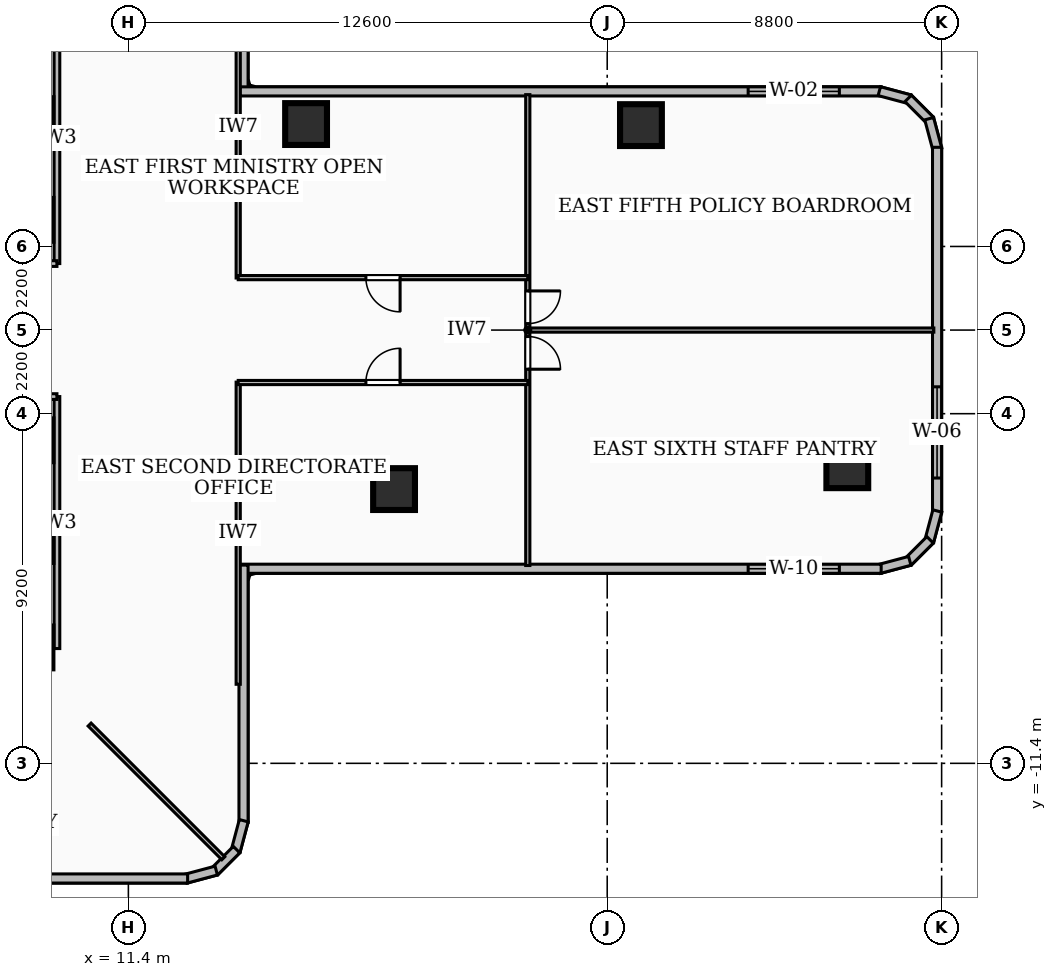
"""IFC4 building model, lengths in metres.
Left out: names, types, materials, properties, quantities, classifications, styles, units other than length and angle.
Written with IfcOpenShell. Run it as: python <this file> out.ifc"""

import sys

from ifc_helpers import new_model, si_unit, direction, frame, frame_2d, origin, origin_2d, place, context, subcontext, project, spatial, rectangle, extrude, element, fill, save


model = new_model("IFC4")
c1 = context("Model", 3, precision=1e-05, world=origin(), true_north=direction((0.0, 1.0)))
c2 = subcontext(c1, "Body", "Model", "MODEL_VIEW")
j1 = project(units=[si_unit("LENGTHUNIT", "METRE"), si_unit("PLANEANGLEUNIT", "RADIAN")], contexts=[c1])
p1 = place(None, origin())
s1 = spatial("IfcSite", under=j1, at=p1, CompositionType="ELEMENT")
p2 = place(p1, origin())
s2 = spatial("IfcBuilding", under=s1, at=p2, CompositionType="ELEMENT")
p3 = place(p2, frame((0.0, 0.0, 28.08)))
s3 = spatial("IfcBuildingStorey", under=s2, at=p3, CompositionType="ELEMENT", Elevation=28.08)
for number, where, z_axis, x_axis in (
    (1, (8.85, -5.55, 0.0), (0.0, 0.0, 1.0), (1.0, 0.0, 0.0)),
    (2, (8.85, -2.9, 0.0), (0.0, 0.0, 1.0), (1.0, 0.0, 0.0)),
    (3, (8.85, 2.9, 0.0), (0.0, 0.0, 1.0), (1.0, 0.0, 0.0)),
    (4, (8.85, 5.55, 0.0), (0.0, 0.0, 1.0), (1.0, 0.0, 0.0)),
    (5, (8.85, -8.35, 0.0), (0.0, 0.0, 1.0), (1.0, 0.0, 0.0)),
    (6, (18.391, -4.184, 0.0), (0.0, 0.0, 1.0), (1.0, 0.0, 0.0)),
    (7, (16.076, 5.421, 0.0), (0.0, 0.0, 1.0), (1.0, 0.0, 0.0)),
    (8, (30.318, -3.609, 0.0), (0.0, 0.0, 1.0), (1.0, 0.0, 0.0)),
    (9, (24.888, 5.393, 0.0), (0.0, 0.0, 1.0), (1.0, 0.0, 0.0)),
):
    element("IfcColumn", number, at=place(p3, frame(where, z_axis=z_axis, x_axis=x_axis)), inside=s3, PredefinedType="COLUMN", context=c2, shape_type="SweptSolid", body=[
        extrude(rectangle(XDim=1.1, YDim=1.1, at=origin_2d()), origin(), (0.0, 0.0, 1.0), 3.6),
    ])
p4 = place(p3, frame((14.43, 12.959, 0.0), z_axis=(0.0, 0.0, 1.0), x_axis=(0.0, -1.0, 0.0)))
e10 = element("IfcWall", 10, at=p4, inside=s3, PredefinedType="SOLIDWALL", context=c2, shape_type="SweptSolid", body=[
    extrude(rectangle(XDim=6.775, YDim=0.24, at=frame_2d((3.387, 0.0))), origin(), (0.0, 0.0, 1.0), 3.34),
])
p5 = place(p3, frame((14.334, 6.28, 0.0), z_axis=(0.0, 0.0, 1.0), x_axis=(1.0, 0.0, 0.0)))
e11 = element("IfcWall", 11, at=p5, inside=s3, PredefinedType="SOLIDWALL", context=c2, shape_type="SweptSolid", body=[
    extrude(rectangle(XDim=16.875, YDim=0.24, at=frame_2d((8.438, 0.0))), origin(), (0.0, 0.0, 1.0), 3.34),
])
p6 = place(p5, frame((13.375, 0.0, 0.85)))
e12 = element("IfcOpeningElement", 12, at=p6, cuts=e11, PredefinedType="OPENING", context=c2, shape_type="SweptSolid", body=[
    extrude(rectangle(XDim=2.4, YDim=2.1, at=frame_2d((1.2, 1.05))), frame((0.0, 0.13, 0.0), z_axis=(0.0, -1.0, 0.0), x_axis=(1.0, 0.0, 0.0)), (0.0, 0.0, 1.0), 0.26),
])
p7 = place(p3, frame((31.16, 6.286, 0.0), z_axis=(0.0, 0.0, 1.0), x_axis=(0.966234939601, -0.25766265056, 0.0)))
e13 = element("IfcWall", 13, at=p7, inside=s3, PredefinedType="SOLIDWALL", context=c2, shape_type="SweptSolid", body=[
    extrude(rectangle(XDim=0.83, YDim=0.24, at=frame_2d((0.415, 0.0))), origin(), (0.0, 0.0, 1.0), 3.34),
])
p8 = place(p3, frame((31.92, 6.096, 0.0), z_axis=(0.0, 0.0, 1.0), x_axis=(0.707256607812, -0.706956922808, 0.0)))
e14 = element("IfcWall", 14, at=p8, inside=s3, PredefinedType="SOLIDWALL", context=c2, shape_type="SweptSolid", body=[
    extrude(rectangle(XDim=0.815, YDim=0.24, at=frame_2d((0.407, 0.0))), origin(), (0.0, 0.0, 1.0), 3.34),
])
p9 = place(p3, frame((32.472, 5.562, 0.0), z_axis=(0.0, 0.0, 1.0), x_axis=(0.257937227116, -0.966161677396, 0.0)))
e15 = element("IfcWall", 15, at=p9, inside=s3, PredefinedType="SOLIDWALL", context=c2, shape_type="SweptSolid", body=[
    extrude(rectangle(XDim=0.83, YDim=0.24, at=frame_2d((0.415, 0.0))), origin(), (0.0, 0.0, 1.0), 3.34),
])
p10 = place(p3, frame((32.68, 4.809, 0.0), z_axis=(0.0, 0.0, 1.0), x_axis=(0.0, -1.0, 0.0)))
e16 = element("IfcWall", 16, at=p10, inside=s3, PredefinedType="SOLIDWALL", context=c2, shape_type="SweptSolid", body=[
    extrude(rectangle(XDim=9.618, YDim=0.24, at=frame_2d((4.809, 0.0))), origin(), (0.0, 0.0, 1.0), 3.34),
])
p11 = place(p10, frame((6.302, 0.0, 0.85)))
e17 = element("IfcOpeningElement", 17, at=p11, cuts=e16, PredefinedType="OPENING", context=c2, shape_type="SweptSolid", body=[
    extrude(rectangle(XDim=2.4, YDim=1.85, at=frame_2d((1.2, 0.925))), frame((0.0, 0.13, 0.0), z_axis=(0.0, -1.0, 0.0), x_axis=(1.0, 0.0, 0.0)), (0.0, 0.0, 1.0), 0.26),
])
p12 = place(p3, frame((32.686, -4.76, 0.0), z_axis=(0.0, 0.0, 1.0), x_axis=(-0.257937227116, -0.966161677396, 0.0)))
e18 = element("IfcWall", 18, at=p12, inside=s3, PredefinedType="SOLIDWALL", context=c2, shape_type="SweptSolid", body=[
    extrude(rectangle(XDim=0.83, YDim=0.24, at=frame_2d((0.415, 0.0))), origin(), (0.0, 0.0, 1.0), 3.34),
])
p13 = place(p3, frame((32.496, -5.52, 0.0), z_axis=(0.0, 0.0, 1.0), x_axis=(-0.707256607812, -0.706956922808, 0.0)))
e19 = element("IfcWall", 19, at=p13, inside=s3, PredefinedType="SOLIDWALL", context=c2, shape_type="SweptSolid", body=[
    extrude(rectangle(XDim=0.815, YDim=0.24, at=frame_2d((0.407, 0.0))), origin(), (0.0, 0.0, 1.0), 3.34),
])
p14 = place(p3, frame((31.962, -6.072, 0.0), z_axis=(0.0, 0.0, 1.0), x_axis=(-0.966234939601, -0.25766265056, 0.0)))
e20 = element("IfcWall", 20, at=p14, inside=s3, PredefinedType="SOLIDWALL", context=c2, shape_type="SweptSolid", body=[
    extrude(rectangle(XDim=0.83, YDim=0.24, at=frame_2d((0.415, 0.0))), origin(), (0.0, 0.0, 1.0), 3.34),
])
p15 = place(p3, frame((31.209, -6.28, 0.0), z_axis=(0.0, 0.0, 1.0), x_axis=(-1.0, 0.0, 0.0)))
e21 = element("IfcWall", 21, at=p15, inside=s3, PredefinedType="SOLIDWALL", context=c2, shape_type="SweptSolid", body=[
    extrude(rectangle(XDim=16.875, YDim=0.24, at=frame_2d((8.438, 0.0))), origin(), (0.0, 0.0, 1.0), 3.34),
])
p16 = place(p15, frame((1.1, 0.0, 0.85)))
e22 = element("IfcOpeningElement", 22, at=p16, cuts=e21, PredefinedType="OPENING", context=c2, shape_type="SweptSolid", body=[
    extrude(rectangle(XDim=2.4, YDim=1.65, at=frame_2d((1.2, 0.825))), frame((0.0, 0.13, 0.0), z_axis=(0.0, -1.0, 0.0), x_axis=(1.0, 0.0, 0.0)), (0.0, 0.0, 1.0), 0.26),
])
p17 = place(p3, frame((14.43, -6.184, 0.0), z_axis=(0.0, 0.0, 1.0), x_axis=(0.0, -1.0, 0.0)))
e23 = element("IfcWall", 23, at=p17, inside=s3, PredefinedType="SOLIDWALL", context=c2, shape_type="SweptSolid", body=[
    extrude(rectangle(XDim=6.775, YDim=0.24, at=frame_2d((3.387, 0.0))), origin(), (0.0, 0.0, 1.0), 3.34),
])
p18 = place(p3, frame((14.436, -12.91, 0.0), z_axis=(0.0, 0.0, 1.0), x_axis=(-0.257937227116, -0.966161677396, 0.0)))
e24 = element("IfcWall", 24, at=p18, inside=s3, PredefinedType="SOLIDWALL", context=c2, shape_type="SweptSolid", body=[
    extrude(rectangle(XDim=0.83, YDim=0.24, at=frame_2d((0.415, 0.0))), origin(), (0.0, 0.0, 1.0), 3.34),
])
p19 = place(p3, frame((14.246, -13.67, 0.0), z_axis=(0.0, 0.0, 1.0), x_axis=(-0.707106781187, -0.707106781187, 0.0)))
e25 = element("IfcWall", 25, at=p19, inside=s3, PredefinedType="SOLIDWALL", context=c2, shape_type="SweptSolid", body=[
    extrude(rectangle(XDim=0.815, YDim=0.24, at=frame_2d((0.407, 0.0))), origin(), (0.0, 0.0, 1.0), 3.34),
])
p20 = place(p3, frame((13.712, -14.222, 0.0), z_axis=(0.0, 0.0, 1.0), x_axis=(-0.966161677396, -0.257937227116, 0.0)))
e26 = element("IfcWall", 26, at=p20, inside=s3, PredefinedType="SOLIDWALL", context=c2, shape_type="SweptSolid", body=[
    extrude(rectangle(XDim=0.83, YDim=0.24, at=frame_2d((0.415, 0.0))), origin(), (0.0, 0.0, 1.0), 3.34),
])
p21 = place(p3, frame((12.959, -14.43, 0.0), z_axis=(0.0, 0.0, 1.0), x_axis=(-1.0, 0.0, 0.0)))
e27 = element("IfcWall", 27, at=p21, inside=s3, PredefinedType="SOLIDWALL", context=c2, shape_type="SweptSolid", body=[
    extrude(rectangle(XDim=6.775, YDim=0.24, at=frame_2d((3.387, 0.0))), origin(), (0.0, 0.0, 1.0), 2.421),
])
p22 = place(p3, frame((9.52, 1.75, 0.0), z_axis=(0.0, 0.0, 1.0), x_axis=(0.0, 1.0, 0.0)))
e28 = element("IfcWall", 28, at=p22, inside=s3, PredefinedType="PARTITIONING", context=c2, shape_type="SweptSolid", body=[
    extrude(rectangle(XDim=6.63, YDim=0.15, at=frame_2d((3.315, 0.0))), origin(), (0.0, 0.0, 1.0), 2.421),
])
p23 = place(p3, frame((7.85, 1.75, 0.0), z_axis=(0.0, 0.0, 1.0), x_axis=(1.0, 0.0, 0.0)))
e29 = element("IfcWall", 29, at=p23, inside=s3, PredefinedType="PARTITIONING", context=c2, shape_type="SweptSolid", body=[
    extrude(rectangle(XDim=1.67, YDim=0.15, at=frame_2d((0.835, 0.0))), origin(), (0.0, 0.0, 1.0), 2.405),
])
p24 = place(p3, frame((9.52, -8.38, 0.0), z_axis=(0.0, 0.0, 1.0), x_axis=(0.0, 1.0, 0.0)))
e30 = element("IfcWall", 30, at=p24, inside=s3, PredefinedType="PARTITIONING", context=c2, shape_type="SweptSolid", body=[
    extrude(rectangle(XDim=6.63, YDim=0.15, at=frame_2d((3.315, 0.0))), origin(), (0.0, 0.0, 1.0), 2.421),
])
p25 = place(p3, frame((7.85, -1.75, 0.0), z_axis=(0.0, 0.0, 1.0), x_axis=(1.0, 0.0, 0.0)))
e31 = element("IfcWall", 31, at=p25, inside=s3, PredefinedType="PARTITIONING", context=c2, shape_type="SweptSolid", body=[
    extrude(rectangle(XDim=1.67, YDim=0.15, at=frame_2d((0.835, 0.0))), origin(), (0.0, 0.0, 1.0), 2.405),
])
p26 = place(p3, frame((10.38, -10.38, 0.0), z_axis=(0.0, 0.0, 1.0), x_axis=(0.707106781187, -0.707106781187, 0.0)))
e32 = element("IfcWall", 32, at=p26, inside=s3, PredefinedType="PARTITIONING", context=c2, shape_type="SweptSolid", body=[
    extrude(rectangle(XDim=4.975, YDim=0.11, at=frame_2d((2.488, 0.0))), origin(), (0.0, 0.0, 1.0), 3.34),
])
for number, where, z_axis, x_axis in (
    (33, (14.29, 1.37, 0.0), (0.0, 0.0, 1.0), (0.0, 1.0, 0.0)),
    (34, (14.29, -9.32, 0.0), (0.0, 0.0, 1.0), (0.0, 1.0, 0.0)),
):
    element("IfcWall", number, at=place(p3, frame(where, z_axis=z_axis, x_axis=x_axis)), inside=s3, PredefinedType="PARTITIONING", context=c2, shape_type="SweptSolid", body=[
        extrude(rectangle(XDim=7.95, YDim=0.11, at=frame_2d((3.975, 0.0))), origin(), (0.0, 0.0, 1.0), 2.421),
    ])
p27 = place(p3, frame((21.91, 1.38, 0.0), z_axis=(0.0, 0.0, 1.0), x_axis=(-1.0, 0.0, 0.0)))
e35 = element("IfcWall", 35, at=p27, inside=s3, PredefinedType="PARTITIONING", context=c2, shape_type="SweptSolid", body=[
    extrude(rectangle(XDim=7.62, YDim=0.11, at=frame_2d((3.81, 0.0))), origin(), (0.0, 0.0, 1.0), 2.869),
])
p28 = place(p27, frame((3.36, 0.0, 0.0)))
e36 = element("IfcOpeningElement", 36, at=p28, cuts=e35, PredefinedType="OPENING", context=c2, shape_type="SweptSolid", body=[
    extrude(rectangle(XDim=0.9, YDim=2.06, at=frame_2d((0.45, 1.03))), frame((0.0, 0.065, 0.0), z_axis=(0.0, -1.0, 0.0), x_axis=(1.0, 0.0, 0.0)), (0.0, 0.0, 1.0), 0.13),
])
p29 = place(p3, frame((14.29, -1.38, 0.0), z_axis=(0.0, 0.0, 1.0), x_axis=(1.0, 0.0, 0.0)))
e37 = element("IfcWall", 37, at=p29, inside=s3, PredefinedType="PARTITIONING", context=c2, shape_type="SweptSolid", body=[
    extrude(rectangle(XDim=7.62, YDim=0.11, at=frame_2d((3.81, 0.0))), origin(), (0.0, 0.0, 1.0), 2.869),
])
p30 = place(p29, frame((3.36, 0.0, 0.0)))
e38 = element("IfcOpeningElement", 38, at=p30, cuts=e37, PredefinedType="OPENING", context=c2, shape_type="SweptSolid", body=[
    extrude(rectangle(XDim=0.9, YDim=2.06, at=frame_2d((0.45, 1.03))), frame((0.0, 0.065, 0.0), z_axis=(0.0, -1.0, 0.0), x_axis=(1.0, 0.0, 0.0)), (0.0, 0.0, 1.0), 0.13),
])
p31 = place(p3, frame((21.97, 0.0, 0.0), z_axis=(0.0, 0.0, 1.0), x_axis=(1.0, 0.0, 0.0)))
e39 = element("IfcWall", 39, at=p31, inside=s3, PredefinedType="PARTITIONING", context=c2, shape_type="SweptSolid", body=[
    extrude(rectangle(XDim=10.625, YDim=0.11, at=frame_2d((5.312, 0.0))), origin(), (0.0, 0.0, 1.0), 2.72),
])
p32 = place(p3, frame((21.91, 6.195, 0.0), z_axis=(0.0, 0.0, 1.0), x_axis=(0.0, -1.0, 0.0)))
e40 = element("IfcWall", 40, at=p32, inside=s3, PredefinedType="PARTITIONING", context=c2, shape_type="SweptSolid", body=[
    extrude(rectangle(XDim=12.39, YDim=0.11, at=frame_2d((6.195, 0.0))), origin(), (0.0, 0.0, 1.0), 2.421),
])
p33 = place(p32, frame((6.365, 0.0, 0.0)))
e41 = element("IfcOpeningElement", 41, at=p33, cuts=e40, PredefinedType="OPENING", context=c2, shape_type="SweptSolid", body=[
    extrude(rectangle(XDim=0.86, YDim=2.04, at=frame_2d((0.43, 1.02))), frame((0.0, 0.065, 0.0), z_axis=(0.0, -1.0, 0.0), x_axis=(1.0, 0.0, 0.0)), (0.0, 0.0, 1.0), 0.13),
])
p34 = place(p32, frame((5.165, 0.0, 0.0)))
e42 = element("IfcOpeningElement", 42, at=p34, cuts=e40, PredefinedType="OPENING", context=c2, shape_type="SweptSolid", body=[
    extrude(rectangle(XDim=0.86, YDim=2.04, at=frame_2d((0.43, 1.02))), frame((0.0, 0.065, 0.0), z_axis=(0.0, -1.0, 0.0), x_axis=(1.0, 0.0, 0.0)), (0.0, 0.0, 1.0), 0.13),
])
p35 = place(p6, origin())
e43 = element("IfcWindow", 43, at=p35, inside=s3, PartitioningType="SINGLE_PANEL", PredefinedType="WINDOW", context=c2, shape_type="SweptSolid", body=[
    extrude(rectangle(XDim=2.4, YDim=2.1, at=frame_2d((1.2, 1.05))), frame((0.0, 0.03, 0.0), z_axis=(0.0, -1.0, 0.0), x_axis=(1.0, 0.0, 0.0)), (0.0, 0.0, 1.0), 0.06),
])
fill(e12, e43)
p36 = place(p11, origin())
e44 = element("IfcWindow", 44, at=p36, inside=s3, PartitioningType="SINGLE_PANEL", PredefinedType="WINDOW", context=c2, shape_type="SweptSolid", body=[
    extrude(rectangle(XDim=2.4, YDim=1.85, at=frame_2d((1.2, 0.925))), frame((0.0, 0.03, 0.0), z_axis=(0.0, -1.0, 0.0), x_axis=(1.0, 0.0, 0.0)), (0.0, 0.0, 1.0), 0.06),
])
fill(e17, e44)
p37 = place(p16, origin())
e45 = element("IfcWindow", 45, at=p37, inside=s3, PartitioningType="SINGLE_PANEL", PredefinedType="WINDOW", context=c2, shape_type="SweptSolid", body=[
    extrude(rectangle(XDim=2.4, YDim=1.65, at=frame_2d((1.2, 0.825))), frame((0.0, 0.03, 0.0), z_axis=(0.0, -1.0, 0.0), x_axis=(1.0, 0.0, 0.0)), (0.0, 0.0, 1.0), 0.06),
])
fill(e22, e45)
p38 = place(p28, origin())
e46 = element("IfcDoor", 46, at=p38, inside=s3, OperationType="SINGLE_SWING_LEFT", PredefinedType="DOOR", context=c2, shape_type="SweptSolid", body=[
    extrude(rectangle(XDim=0.9, YDim=2.06, at=frame_2d((0.45, 1.03))), frame((0.0, 0.025, 0.0), z_axis=(0.0, -1.0, 0.0), x_axis=(1.0, 0.0, 0.0)), (0.0, 0.0, 1.0), 0.05),
])
fill(e36, e46)
p39 = place(p30, origin())
e47 = element("IfcDoor", 47, at=p39, inside=s3, OperationType="SINGLE_SWING_RIGHT", PredefinedType="DOOR", context=c2, shape_type="SweptSolid", body=[
    extrude(rectangle(XDim=0.9, YDim=2.06, at=frame_2d((0.45, 1.03))), frame((0.0, 0.025, 0.0), z_axis=(0.0, -1.0, 0.0), x_axis=(1.0, 0.0, 0.0)), (0.0, 0.0, 1.0), 0.05),
])
fill(e38, e47)
p40 = place(p33, origin())
e48 = element("IfcDoor", 48, at=p40, inside=s3, OperationType="SINGLE_SWING_RIGHT", PredefinedType="DOOR", context=c2, shape_type="SweptSolid", body=[
    extrude(rectangle(XDim=0.86, YDim=2.04, at=frame_2d((0.43, 1.02))), frame((0.0, 0.025, 0.0), z_axis=(0.0, -1.0, 0.0), x_axis=(1.0, 0.0, 0.0)), (0.0, 0.0, 1.0), 0.05),
])
fill(e41, e48)
p41 = place(p34, origin())
e49 = element("IfcDoor", 49, at=p41, inside=s3, OperationType="SINGLE_SWING_LEFT", PredefinedType="DOOR", context=c2, shape_type="SweptSolid", body=[
    extrude(rectangle(XDim=0.86, YDim=2.04, at=frame_2d((0.43, 1.02))), frame((0.0, 0.025, 0.0), z_axis=(0.0, -1.0, 0.0), x_axis=(1.0, 0.0, 0.0)), (0.0, 0.0, 1.0), 0.05),
])
fill(e42, e49)
save(model, sys.argv[1])
